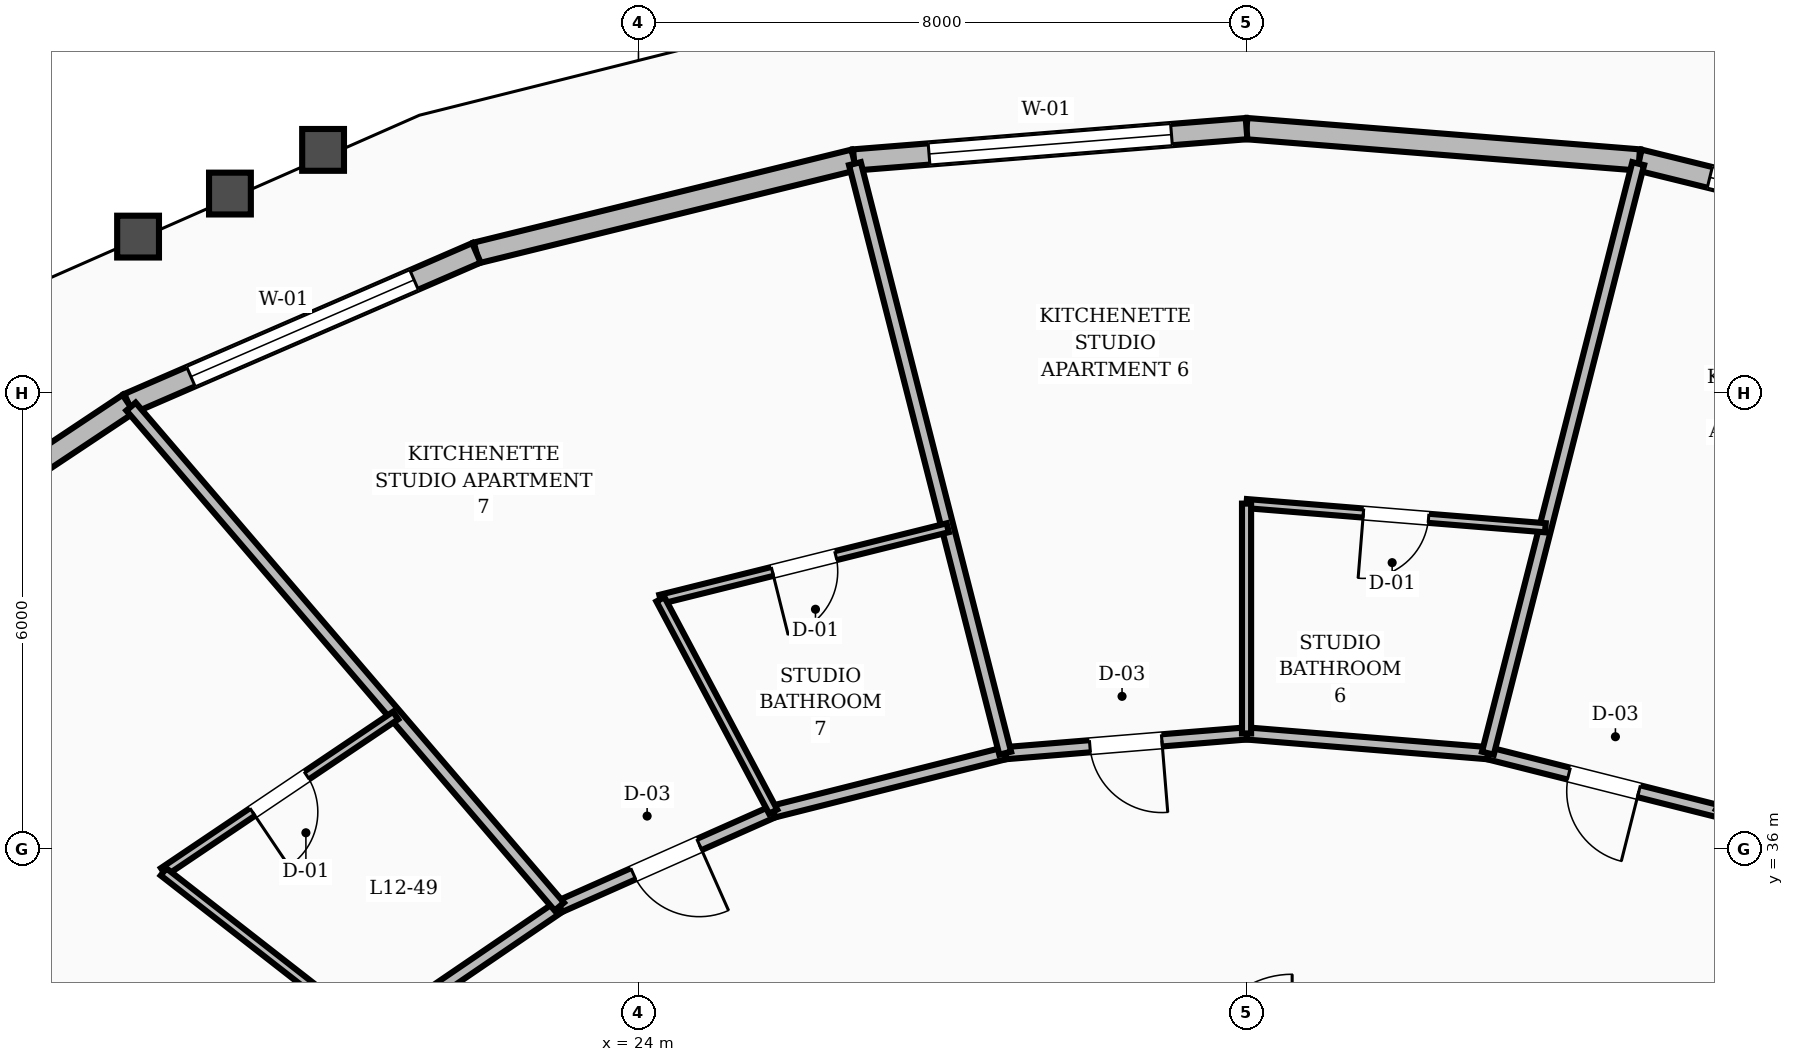
"""IFC4 building model, lengths in metres.
Left out: names, types, materials, properties, quantities, classifications, styles, units other than length and angle.
Written with IfcOpenShell. Run it as: python <this file> out.ifc"""

import sys

from ifc_helpers import new_model, si_unit, direction, frame, frame_2d, origin, place, context, subcontext, project, spatial, rectangle, extrude, element, fill, save


model = new_model("IFC4")
c1 = context("Model", 3, precision=1e-05, world=origin(), true_north=direction((0.0, 1.0)))
c2 = subcontext(c1, "Body", "Model", "MODEL_VIEW")
j1 = project(units=[si_unit("LENGTHUNIT", "METRE"), si_unit("PLANEANGLEUNIT", "RADIAN")], contexts=[c1])
p1 = place(None, origin())
s1 = spatial("IfcSite", under=j1, at=p1, CompositionType="ELEMENT")
p2 = place(p1, origin())
s2 = spatial("IfcBuilding", under=s1, at=p2, CompositionType="ELEMENT")
p3 = place(p2, frame((0.0, 0.0, 52.0)))
s3 = spatial("IfcBuildingStorey", under=s2, at=p3, CompositionType="ELEMENT", Elevation=52.0)
p4 = place(p3, frame((42.132, 43.841, 0.0), z_axis=(0.0, 0.0, 1.0), x_axis=(-0.971042653892, 0.238906183096, 0.0)))
e1 = element("IfcWall", 1, at=p4, inside=s3, PredefinedType="STANDARD", context=c2, shape_type="SweptSolid", body=[
    extrude(rectangle(XDim=5.115, YDim=0.28, at=frame_2d((2.557, 0.0))), origin(), (0.0, 0.0, 1.0), 2.65),
])
p5 = place(p4, frame((0.957, 0.0, 0.8)))
e2 = element("IfcOpeningElement", 2, at=p5, cuts=e1, PredefinedType="OPENING", context=c2, shape_type="SweptSolid", body=[
    extrude(rectangle(XDim=3.2, YDim=1.65, at=frame_2d((1.6, 0.825))), frame((0.0, 0.15, 0.0), z_axis=(0.0, -1.0, 0.0), x_axis=(1.0, 0.0, 0.0)), (0.0, 0.0, 1.0), 0.3),
])
p6 = place(p3, frame((37.165, 45.062, 0.0), z_axis=(0.0, 0.0, 1.0), x_axis=(-0.996824560501, 0.079629112651, 0.0)))
e3 = element("IfcWall", 3, at=p6, inside=s3, PredefinedType="STANDARD", context=c2, shape_type="SweptSolid", body=[
    extrude(rectangle(XDim=5.181, YDim=0.28, at=frame_2d((2.591, 0.0))), origin(), (0.0, 0.0, 1.0), 2.65),
])
p7 = place(p3, frame((32.0, 45.475, 0.0), z_axis=(0.0, 0.0, 1.0), x_axis=(-0.996824560501, -0.079629112651, 0.0)))
e4 = element("IfcWall", 4, at=p7, inside=s3, PredefinedType="STANDARD", context=c2, shape_type="SweptSolid", body=[
    extrude(rectangle(XDim=5.181, YDim=0.28, at=frame_2d((2.591, 0.0))), origin(), (0.0, 0.0, 1.0), 2.65),
])
p8 = place(p7, frame((0.991, 0.0, 0.8)))
e5 = element("IfcOpeningElement", 5, at=p8, cuts=e4, PredefinedType="OPENING", context=c2, shape_type="SweptSolid", body=[
    extrude(rectangle(XDim=3.2, YDim=1.65, at=frame_2d((1.6, 0.825))), frame((0.0, 0.15, 0.0), z_axis=(0.0, -1.0, 0.0), x_axis=(1.0, 0.0, 0.0)), (0.0, 0.0, 1.0), 0.3),
])
p9 = place(p3, frame((26.835, 45.062, 0.0), z_axis=(0.0, 0.0, 1.0), x_axis=(-0.971042653892, -0.238906183096, 0.0)))
e6 = element("IfcWall", 6, at=p9, inside=s3, PredefinedType="STANDARD", context=c2, shape_type="SweptSolid", body=[
    extrude(rectangle(XDim=5.115, YDim=0.28, at=frame_2d((2.557, 0.0))), origin(), (0.0, 0.0, 1.0), 2.65),
])
p10 = place(p3, frame((21.868, 43.841, 0.0), z_axis=(0.0, 0.0, 1.0), x_axis=(-0.917468716398, -0.397807936612, 0.0)))
e7 = element("IfcWall", 7, at=p10, inside=s3, PredefinedType="STANDARD", context=c2, shape_type="SweptSolid", body=[
    extrude(rectangle(XDim=4.989, YDim=0.28, at=frame_2d((2.494, 0.0))), origin(), (0.0, 0.0, 1.0), 2.65),
])
p11 = place(p10, frame((0.894, 0.0, 0.8)))
e8 = element("IfcOpeningElement", 8, at=p11, cuts=e7, PredefinedType="OPENING", context=c2, shape_type="SweptSolid", body=[
    extrude(rectangle(XDim=3.2, YDim=1.65, at=frame_2d((1.6, 0.825))), frame((0.0, 0.15, 0.0), z_axis=(0.0, -1.0, 0.0), x_axis=(1.0, 0.0, 0.0)), (0.0, 0.0, 1.0), 0.3),
])
p12 = place(p3, frame((17.291, 41.856, 0.0), z_axis=(0.0, 0.0, 1.0), x_axis=(-0.832431966359, -0.554127261, 0.0)))
e9 = element("IfcWall", 9, at=p12, inside=s3, PredefinedType="STANDARD", context=c2, shape_type="SweptSolid", body=[
    extrude(rectangle(XDim=4.82, YDim=0.28, at=frame_2d((2.41, 0.0))), origin(), (0.0, 0.0, 1.0), 2.65),
])
p13 = place(p3, frame((38.228, 36.489, 0.0), z_axis=(0.0, 0.0, 1.0), x_axis=(-0.969689238064, 0.244341526521, 0.0)))
e10 = element("IfcWall", 10, at=p13, inside=s3, PredefinedType="SOLIDWALL", context=c2, shape_type="SweptSolid", body=[
    extrude(rectangle(XDim=3.148, YDim=0.16, at=frame_2d((1.574, 0.0))), origin(), (0.0, 0.0, 1.0), 2.61),
])
p14 = place(p13, frame((1.099, 0.0, 0.0)))
e11 = element("IfcOpeningElement", 11, at=p14, cuts=e10, PredefinedType="OPENING", context=c2, shape_type="SweptSolid", body=[
    extrude(rectangle(XDim=0.95, YDim=2.1, at=frame_2d((0.475, 1.05))), frame((0.0, 0.09, 0.0), z_axis=(0.0, -1.0, 0.0), x_axis=(1.0, 0.0, 0.0)), (0.0, 0.0, 1.0), 0.18),
])
p15 = place(p3, frame((35.175, 37.258, 0.0), z_axis=(0.0, 0.0, 1.0), x_axis=(-0.996669377538, 0.081548463373, 0.0)))
e12 = element("IfcWall", 12, at=p15, inside=s3, PredefinedType="SOLIDWALL", context=c2, shape_type="SweptSolid", body=[
    extrude(rectangle(XDim=3.185, YDim=0.16, at=frame_2d((1.593, 0.0))), origin(), (0.0, 0.0, 1.0), 2.61),
])
p16 = place(p3, frame((32.0, 37.518, 0.0), z_axis=(0.0, 0.0, 1.0), x_axis=(-0.996669377538, -0.081548463373, 0.0)))
e13 = element("IfcWall", 13, at=p16, inside=s3, PredefinedType="SOLIDWALL", context=c2, shape_type="SweptSolid", body=[
    extrude(rectangle(XDim=3.185, YDim=0.16, at=frame_2d((1.593, 0.0))), origin(), (0.0, 0.0, 1.0), 2.61),
])
p17 = place(p16, frame((1.118, 0.0, 0.0)))
e14 = element("IfcOpeningElement", 14, at=p17, cuts=e13, PredefinedType="OPENING", context=c2, shape_type="SweptSolid", body=[
    extrude(rectangle(XDim=0.95, YDim=2.1, at=frame_2d((0.475, 1.05))), frame((0.0, 0.09, 0.0), z_axis=(0.0, -1.0, 0.0), x_axis=(1.0, 0.0, 0.0)), (0.0, 0.0, 1.0), 0.18),
])
p18 = place(p3, frame((28.825, 37.258, 0.0), z_axis=(0.0, 0.0, 1.0), x_axis=(-0.969689238064, -0.244341526521, 0.0)))
e15 = element("IfcWall", 15, at=p18, inside=s3, PredefinedType="SOLIDWALL", context=c2, shape_type="SweptSolid", body=[
    extrude(rectangle(XDim=3.148, YDim=0.16, at=frame_2d((1.574, 0.0))), origin(), (0.0, 0.0, 1.0), 2.61),
])
p19 = place(p3, frame((25.772, 36.489, 0.0), z_axis=(0.0, 0.0, 1.0), x_axis=(-0.913952123493, -0.405822024984, 0.0)))
e16 = element("IfcWall", 16, at=p19, inside=s3, PredefinedType="SOLIDWALL", context=c2, shape_type="SweptSolid", body=[
    extrude(rectangle(XDim=3.078, YDim=0.16, at=frame_2d((1.539, 0.0))), origin(), (0.0, 0.0, 1.0), 2.61),
])
p20 = place(p19, frame((1.064, 0.0, 0.0)))
e17 = element("IfcOpeningElement", 17, at=p20, cuts=e16, PredefinedType="OPENING", context=c2, shape_type="SweptSolid", body=[
    extrude(rectangle(XDim=0.95, YDim=2.1, at=frame_2d((0.475, 1.05))), frame((0.0, 0.09, 0.0), z_axis=(0.0, -1.0, 0.0), x_axis=(1.0, 0.0, 0.0)), (0.0, 0.0, 1.0), 0.18),
])
p21 = place(p3, frame((22.959, 35.24, 0.0), z_axis=(0.0, 0.0, 1.0), x_axis=(-0.826293096206, -0.56324037423, 0.0)))
e18 = element("IfcWall", 18, at=p21, inside=s3, PredefinedType="SOLIDWALL", context=c2, shape_type="SweptSolid", body=[
    extrude(rectangle(XDim=2.985, YDim=0.16, at=frame_2d((1.492, 0.0))), origin(), (0.0, 0.0, 1.0), 2.61),
])
p22 = place(p3, frame((35.175, 37.258, 0.0), z_axis=(0.0, 0.0, 1.0), x_axis=(0.247097489617, 0.968990624632, 0.0)))
e19 = element("IfcWall", 19, at=p22, inside=s3, PredefinedType="SOLIDWALL", context=c2, shape_type="SweptSolid", body=[
    extrude(rectangle(XDim=8.004, YDim=0.16, at=frame_2d((4.002, 0.0))), origin(), (0.0, 0.0, 1.0), 2.61),
])
p23 = place(p3, frame((35.931, 40.224, 0.0), z_axis=(0.0, 0.0, 1.0), x_axis=(-0.996746812946, 0.080596469411, 0.0)))
e20 = element("IfcWall", 20, at=p23, inside=s3, PredefinedType="PARTITIONING", context=c2, shape_type="SweptSolid", body=[
    extrude(rectangle(XDim=3.944, YDim=0.12, at=frame_2d((1.972, 0.0))), origin(), (0.0, 0.0, 1.0), 2.61),
])
p24 = place(p23, frame((1.542, 0.0, 0.0)))
e21 = element("IfcOpeningElement", 21, at=p24, cuts=e20, PredefinedType="OPENING", context=c2, shape_type="SweptSolid", body=[
    extrude(rectangle(XDim=0.86, YDim=2.1, at=frame_2d((0.43, 1.05))), frame((0.0, 0.07, 0.0), z_axis=(0.0, -1.0, 0.0), x_axis=(1.0, 0.0, 0.0)), (0.0, 0.0, 1.0), 0.14),
])
p25 = place(p3, frame((32.0, 37.518, 0.0), z_axis=(0.0, 0.0, 1.0), x_axis=(0.0, 1.0, 0.0)))
e22 = element("IfcWall", 22, at=p25, inside=s3, PredefinedType="PARTITIONING", context=c2, shape_type="SweptSolid", body=[
    extrude(rectangle(XDim=3.024, YDim=0.12, at=frame_2d((1.512, 0.0))), origin(), (0.0, 0.0, 1.0), 2.61),
])
p26 = place(p3, frame((28.825, 37.258, 0.0), z_axis=(0.0, 0.0, 1.0), x_axis=(-0.247097489617, 0.968990624632, 0.0)))
e23 = element("IfcWall", 23, at=p26, inside=s3, PredefinedType="SOLIDWALL", context=c2, shape_type="SweptSolid", body=[
    extrude(rectangle(XDim=8.004, YDim=0.16, at=frame_2d((4.002, 0.0))), origin(), (0.0, 0.0, 1.0), 2.61),
])
p27 = place(p3, frame((28.069, 40.224, 0.0), z_axis=(0.0, 0.0, 1.0), x_axis=(-0.970374316044, -0.241606470862, 0.0)))
e24 = element("IfcWall", 24, at=p27, inside=s3, PredefinedType="PARTITIONING", context=c2, shape_type="SweptSolid", body=[
    extrude(rectangle(XDim=3.896, YDim=0.12, at=frame_2d((1.948, 0.0))), origin(), (0.0, 0.0, 1.0), 2.61),
])
p28 = place(p27, frame((1.518, 0.0, 0.0)))
e25 = element("IfcOpeningElement", 25, at=p28, cuts=e24, PredefinedType="OPENING", context=c2, shape_type="SweptSolid", body=[
    extrude(rectangle(XDim=0.86, YDim=2.1, at=frame_2d((0.43, 1.05))), frame((0.0, 0.07, 0.0), z_axis=(0.0, -1.0, 0.0), x_axis=(1.0, 0.0, 0.0)), (0.0, 0.0, 1.0), 0.14),
])
p29 = place(p3, frame((25.772, 36.489, 0.0), z_axis=(0.0, 0.0, 1.0), x_axis=(-0.468968986747, 0.883214633863, 0.0)))
e26 = element("IfcWall", 26, at=p29, inside=s3, PredefinedType="PARTITIONING", context=c2, shape_type="SweptSolid", body=[
    extrude(rectangle(XDim=3.163, YDim=0.12, at=frame_2d((1.582, 0.0))), origin(), (0.0, 0.0, 1.0), 2.61),
])
p30 = place(p3, frame((22.959, 35.24, 0.0), z_axis=(0.0, 0.0, 1.0), x_axis=(-0.650552260828, 0.75946149075, 0.0)))
e27 = element("IfcWall", 27, at=p30, inside=s3, PredefinedType="SOLIDWALL", context=c2, shape_type="SweptSolid", body=[
    extrude(rectangle(XDim=8.662, YDim=0.16, at=frame_2d((4.331, 0.0))), origin(), (0.0, 0.0, 1.0), 2.61),
])
p31 = place(p3, frame((20.805, 37.754, 0.0), z_axis=(0.0, 0.0, 1.0), x_axis=(-0.829367953904, -0.558702780588, 0.0)))
e28 = element("IfcWall", 28, at=p31, inside=s3, PredefinedType="PARTITIONING", context=c2, shape_type="SweptSolid", body=[
    extrude(rectangle(XDim=3.682, YDim=0.12, at=frame_2d((1.841, 0.0))), origin(), (0.0, 0.0, 1.0), 2.61),
])
p32 = place(p31, frame((1.411, 0.0, 0.0)))
e29 = element("IfcOpeningElement", 29, at=p32, cuts=e28, PredefinedType="OPENING", context=c2, shape_type="SweptSolid", body=[
    extrude(rectangle(XDim=0.86, YDim=2.1, at=frame_2d((0.43, 1.05))), frame((0.0, 0.07, 0.0), z_axis=(0.0, -1.0, 0.0), x_axis=(1.0, 0.0, 0.0)), (0.0, 0.0, 1.0), 0.14),
])
p33 = place(p3, frame((20.492, 33.559, 0.0), z_axis=(0.0, 0.0, 1.0), x_axis=(-0.788470290208, 0.615072842401, 0.0)))
e30 = element("IfcWall", 30, at=p33, inside=s3, PredefinedType="PARTITIONING", context=c2, shape_type="SweptSolid", body=[
    extrude(rectangle(XDim=3.476, YDim=0.12, at=frame_2d((1.738, 0.0))), origin(), (0.0, 0.0, 1.0), 2.61),
])
p34 = place(p5, origin())
e31 = element("IfcWindow", 31, at=p34, inside=s3, PartitioningType="SINGLE_PANEL", PredefinedType="WINDOW", context=c2, shape_type="SweptSolid", body=[
    extrude(rectangle(XDim=3.2, YDim=1.65, at=frame_2d((1.6, 0.825))), frame((0.0, 0.03, 0.0), z_axis=(0.0, -1.0, 0.0), x_axis=(1.0, 0.0, 0.0)), (0.0, 0.0, 1.0), 0.06),
])
fill(e2, e31)
p35 = place(p8, origin())
e32 = element("IfcWindow", 32, at=p35, inside=s3, PartitioningType="SINGLE_PANEL", PredefinedType="WINDOW", context=c2, shape_type="SweptSolid", body=[
    extrude(rectangle(XDim=3.2, YDim=1.65, at=frame_2d((1.6, 0.825))), frame((0.0, 0.03, 0.0), z_axis=(0.0, -1.0, 0.0), x_axis=(1.0, 0.0, 0.0)), (0.0, 0.0, 1.0), 0.06),
])
fill(e5, e32)
p36 = place(p11, origin())
e33 = element("IfcWindow", 33, at=p36, inside=s3, PartitioningType="SINGLE_PANEL", PredefinedType="WINDOW", context=c2, shape_type="SweptSolid", body=[
    extrude(rectangle(XDim=3.2, YDim=1.65, at=frame_2d((1.6, 0.825))), frame((0.0, 0.03, 0.0), z_axis=(0.0, -1.0, 0.0), x_axis=(1.0, 0.0, 0.0)), (0.0, 0.0, 1.0), 0.06),
])
fill(e8, e33)
p37 = place(p14, origin())
e34 = element("IfcDoor", 34, at=p37, inside=s3, OperationType="SINGLE_SWING_LEFT", PredefinedType="DOOR", context=c2, shape_type="SweptSolid", body=[
    extrude(rectangle(XDim=0.95, YDim=2.1, at=frame_2d((0.475, 1.05))), frame((0.0, 0.025, 0.0), z_axis=(0.0, -1.0, 0.0), x_axis=(1.0, 0.0, 0.0)), (0.0, 0.0, 1.0), 0.05),
])
fill(e11, e34)
p38 = place(p24, origin())
e35 = element("IfcDoor", 35, at=p38, inside=s3, OperationType="SINGLE_SWING_RIGHT", PredefinedType="DOOR", context=c2, shape_type="SweptSolid", body=[
    extrude(rectangle(XDim=0.86, YDim=2.1, at=frame_2d((0.43, 1.05))), frame((0.0, 0.025, 0.0), z_axis=(0.0, -1.0, 0.0), x_axis=(1.0, 0.0, 0.0)), (0.0, 0.0, 1.0), 0.05),
])
fill(e21, e35)
p39 = place(p17, origin())
e36 = element("IfcDoor", 36, at=p39, inside=s3, OperationType="SINGLE_SWING_LEFT", PredefinedType="DOOR", context=c2, shape_type="SweptSolid", body=[
    extrude(rectangle(XDim=0.95, YDim=2.1, at=frame_2d((0.475, 1.05))), frame((0.0, 0.025, 0.0), z_axis=(0.0, -1.0, 0.0), x_axis=(1.0, 0.0, 0.0)), (0.0, 0.0, 1.0), 0.05),
])
fill(e14, e36)
p40 = place(p28, origin())
e37 = element("IfcDoor", 37, at=p40, inside=s3, OperationType="SINGLE_SWING_RIGHT", PredefinedType="DOOR", context=c2, shape_type="SweptSolid", body=[
    extrude(rectangle(XDim=0.86, YDim=2.1, at=frame_2d((0.43, 1.05))), frame((0.0, 0.025, 0.0), z_axis=(0.0, -1.0, 0.0), x_axis=(1.0, 0.0, 0.0)), (0.0, 0.0, 1.0), 0.05),
])
fill(e25, e37)
p41 = place(p20, origin())
e38 = element("IfcDoor", 38, at=p41, inside=s3, OperationType="SINGLE_SWING_LEFT", PredefinedType="DOOR", context=c2, shape_type="SweptSolid", body=[
    extrude(rectangle(XDim=0.95, YDim=2.1, at=frame_2d((0.475, 1.05))), frame((0.0, 0.025, 0.0), z_axis=(0.0, -1.0, 0.0), x_axis=(1.0, 0.0, 0.0)), (0.0, 0.0, 1.0), 0.05),
])
fill(e17, e38)
p42 = place(p32, origin())
e39 = element("IfcDoor", 39, at=p42, inside=s3, OperationType="SINGLE_SWING_RIGHT", PredefinedType="DOOR", context=c2, shape_type="SweptSolid", body=[
    extrude(rectangle(XDim=0.86, YDim=2.1, at=frame_2d((0.43, 1.05))), frame((0.0, 0.025, 0.0), z_axis=(0.0, -1.0, 0.0), x_axis=(1.0, 0.0, 0.0)), (0.0, 0.0, 1.0), 0.05),
])
fill(e29, e39)
save(model, sys.argv[1])
